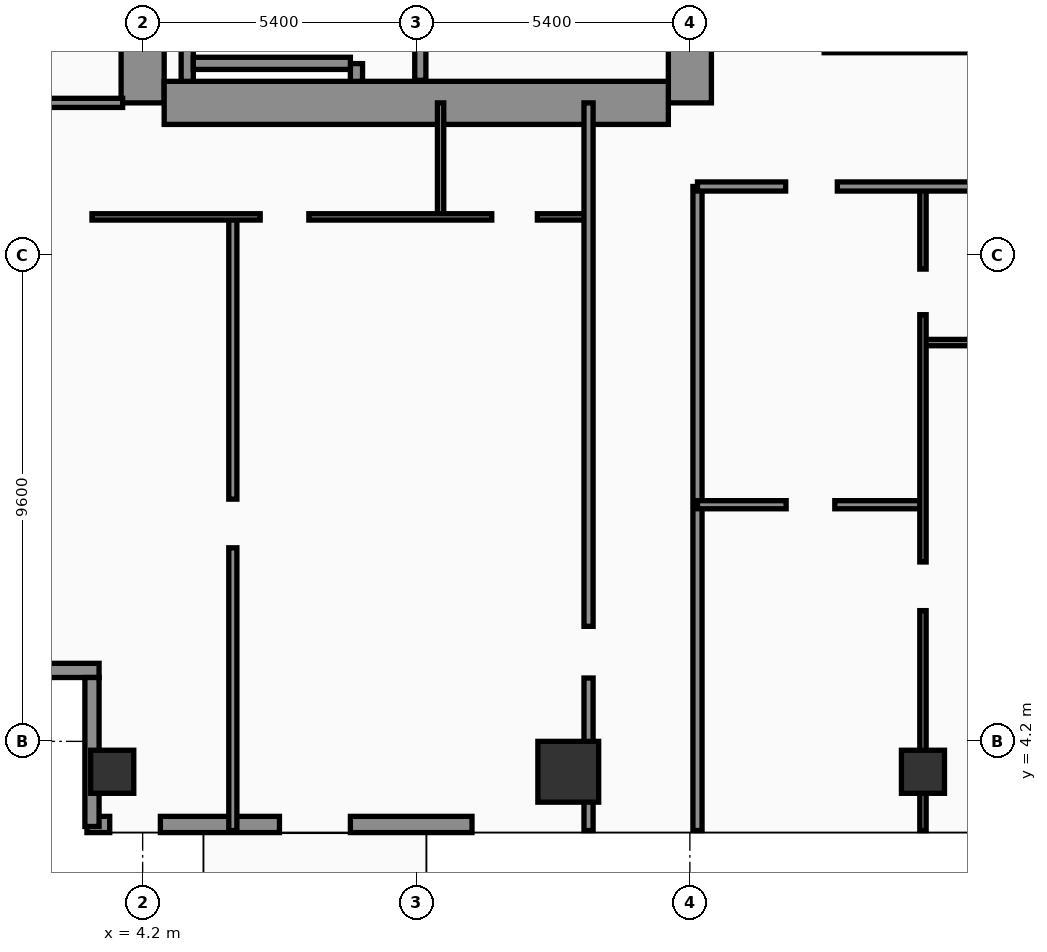
"""IFC4 building model, lengths in metres.
Left out: names, types, materials, properties, quantities, classifications, styles, units other than length and angle.
Written with IfcOpenShell. Run it as: python <this file> out.ifc"""

import sys

from ifc_helpers import new_model, si_unit, direction, frame, frame_2d, origin, origin_2d, place, context, subcontext, project, spatial, rectangle, hollow_rectangle, extrude, element, fill, save


model = new_model("IFC4")
c1 = context("Model", 3, precision=1e-05, world=origin(), true_north=direction((0.0, 1.0)))
c2 = subcontext(c1, "Body", "Model", "MODEL_VIEW")
j1 = project(units=[si_unit("LENGTHUNIT", "METRE"), si_unit("PLANEANGLEUNIT", "RADIAN")], contexts=[c1])
p1 = place(None, origin())
s1 = spatial("IfcSite", under=j1, at=p1, CompositionType="ELEMENT")
p2 = place(p1, origin())
s2 = spatial("IfcBuilding", under=s1, at=p2, CompositionType="ELEMENT")
p3 = place(p2, frame((0.0, 0.0, 116.4)))
s3 = spatial("IfcBuildingStorey", under=s2, at=p3, CompositionType="ELEMENT", Elevation=116.4)
p4 = place(p3, frame((4.2, 16.8, 0.0), z_axis=(0.0, 0.0, 1.0), x_axis=(0.0, 1.0, 0.0)))
e1 = element("IfcWall", 1, at=p4, inside=s3, PredefinedType="SHEAR", context=c2, shape_type="SweptSolid", body=[
    extrude(rectangle(XDim=21.6, YDim=0.85, at=frame_2d((10.8, 0.0))), origin(), (0.0, 0.0, 1.0), 3.56),
])
p5 = place(p3, frame((15.0, 16.8, 0.0), z_axis=(0.0, 0.0, 1.0), x_axis=(0.0, 1.0, 0.0)))
e2 = element("IfcWall", 2, at=p5, inside=s3, PredefinedType="SHEAR", context=c2, shape_type="SweptSolid", body=[
    extrude(rectangle(XDim=21.6, YDim=0.85, at=frame_2d((10.8, 0.0))), origin(), (0.0, 0.0, 1.0), 3.56),
])
p6 = place(p5, frame((8.65, 0.0, 0.0)))
e3 = element("IfcOpeningElement", 3, at=p6, cuts=e2, PredefinedType="OPENING", context=c2, shape_type="SweptSolid", body=[
    extrude(rectangle(XDim=1.1, YDim=2.2, at=frame_2d((0.55, 1.1))), frame((0.0, 0.435, 0.0), z_axis=(0.0, -1.0, 0.0), x_axis=(1.0, 0.0, 0.0)), (0.0, 0.0, 1.0), 0.87),
])
p7 = place(p5, frame((10.85, 0.0, 0.0)))
e4 = element("IfcOpeningElement", 4, at=p7, cuts=e2, PredefinedType="OPENING", context=c2, shape_type="SweptSolid", body=[
    extrude(rectangle(XDim=1.1, YDim=2.2, at=frame_2d((0.55, 1.1))), frame((0.0, 0.435, 0.0), z_axis=(0.0, -1.0, 0.0), x_axis=(1.0, 0.0, 0.0)), (0.0, 0.0, 1.0), 0.87),
])
p8 = place(p5, frame((13.5, 0.0, 0.0)))
e5 = element("IfcOpeningElement", 5, at=p8, cuts=e2, PredefinedType="OPENING", context=c2, shape_type="SweptSolid", body=[
    extrude(rectangle(XDim=1.1, YDim=2.2, at=frame_2d((0.55, 1.1))), frame((0.0, 0.435, 0.0), z_axis=(0.0, -1.0, 0.0), x_axis=(1.0, 0.0, 0.0)), (0.0, 0.0, 1.0), 0.87),
])
p9 = place(p5, frame((16.15, 0.0, 0.0)))
e6 = element("IfcOpeningElement", 6, at=p9, cuts=e2, PredefinedType="OPENING", context=c2, shape_type="SweptSolid", body=[
    extrude(rectangle(XDim=1.1, YDim=2.2, at=frame_2d((0.55, 1.1))), frame((0.0, 0.435, 0.0), z_axis=(0.0, -1.0, 0.0), x_axis=(1.0, 0.0, 0.0)), (0.0, 0.0, 1.0), 0.87),
])
p10 = place(p3, frame((4.625, 16.8, 0.0), z_axis=(0.0, 0.0, 1.0), x_axis=(1.0, 0.0, 0.0)))
e7 = element("IfcWall", 7, at=p10, inside=s3, PredefinedType="SHEAR", context=c2, shape_type="SweptSolid", body=[
    extrude(rectangle(XDim=9.95, YDim=0.85, at=frame_2d((4.975, 0.0))), origin(), (0.0, 0.0, 1.0), 3.56),
])
p11 = place(p3, frame((5.08, 17.225, 0.0), z_axis=(0.0, 0.0, 1.0), x_axis=(0.0, 1.0, 0.0)))
e8 = element("IfcWall", 8, at=p11, inside=s3, PredefinedType="SOLIDWALL", context=c2, shape_type="SweptSolid", body=[
    extrude(rectangle(XDim=9.565, YDim=0.24, at=frame_2d((4.782, 0.0))), origin(), (0.0, 0.0, 1.0), 3.56),
])
p12 = place(p3, frame((8.42, 17.225, 0.0), z_axis=(0.0, 0.0, 1.0), x_axis=(0.0, 1.0, 0.0)))
e9 = element("IfcWall", 9, at=p12, inside=s3, PredefinedType="SOLIDWALL", context=c2, shape_type="SweptSolid", body=[
    extrude(rectangle(XDim=9.565, YDim=0.24, at=frame_2d((4.782, 0.0))), origin(), (0.0, 0.0, 1.0), 3.56),
])
p13 = place(p12, frame((0.35, 0.0, 0.0)))
e10 = element("IfcOpeningElement", 10, at=p13, cuts=e9, PredefinedType="OPENING", context=c2, shape_type="SweptSolid", body=[
    extrude(rectangle(XDim=1.15, YDim=2.2, at=frame_2d((0.575, 1.1))), frame((0.0, 0.13, 0.0), z_axis=(0.0, -1.0, 0.0), x_axis=(1.0, 0.0, 0.0)), (0.0, 0.0, 1.0), 0.26),
])
p14 = place(p3, frame((5.2, 17.58, 0.0), z_axis=(0.0, 0.0, 1.0), x_axis=(1.0, 0.0, 0.0)))
e11 = element("IfcWall", 11, at=p14, inside=s3, PredefinedType="SOLIDWALL", context=c2, shape_type="SweptSolid", body=[
    extrude(rectangle(XDim=3.1, YDim=0.24, at=frame_2d((1.55, 0.0))), origin(), (0.0, 0.0, 1.0), 3.56),
])
p15 = place(p3, frame((3.6, 3.6, 0.0), z_axis=(0.0, 0.0, 1.0), x_axis=(1.0, 0.0, 0.0)))
e12 = element("IfcColumn", 12, at=p15, inside=s3, PredefinedType="COLUMN", context=c2, shape_type="SweptSolid", body=[
    extrude(hollow_rectangle(XDim=0.85, YDim=0.85, WallThickness=0.036, at=origin_2d()), origin(), (0.0, 0.0, 1.0), 3.56),
])
p16 = place(p3, frame((12.6, 3.6, 0.0), z_axis=(0.0, 0.0, 1.0), x_axis=(1.0, 0.0, 0.0)))
e13 = element("IfcColumn", 13, at=p16, inside=s3, PredefinedType="COLUMN", context=c2, shape_type="SweptSolid", body=[
    extrude(rectangle(XDim=1.2, YDim=1.2, at=origin_2d()), origin(), (0.0, 0.0, 1.0), 3.56),
])
p17 = place(p3, frame((19.6, 3.6, 0.0), z_axis=(0.0, 0.0, 1.0), x_axis=(1.0, 0.0, 0.0)))
e14 = element("IfcColumn", 14, at=p17, inside=s3, PredefinedType="COLUMN", context=c2, shape_type="SweptSolid", body=[
    extrude(hollow_rectangle(XDim=0.85, YDim=0.85, WallThickness=0.036, at=origin_2d()), origin(), (0.0, 0.0, 1.0), 3.56),
])
p18 = place(p3, frame((3.1, 2.56, 0.0), z_axis=(0.0, 0.0, 1.0), x_axis=(1.0, 0.0, 0.0)))
e15 = element("IfcWall", 15, at=p18, inside=s3, PredefinedType="SOLIDWALL", context=c2, shape_type="SweptSolid", body=[
    extrude(rectangle(XDim=7.6, YDim=0.32, at=frame_2d((3.8, 0.0))), origin(), (0.0, 0.0, 1.0), 3.56),
])
p19 = place(p18, frame((0.45, 0.0, 0.75)))
e16 = element("IfcOpeningElement", 16, at=p19, cuts=e15, PredefinedType="OPENING", context=c2, shape_type="SweptSolid", body=[
    extrude(rectangle(XDim=1.0, YDim=1.6, at=frame_2d((0.5, 0.8))), frame((0.0, 0.17, 0.0), z_axis=(0.0, -1.0, 0.0), x_axis=(1.0, 0.0, 0.0)), (0.0, 0.0, 1.0), 0.34),
])
p20 = place(p18, frame((3.8, 0.0, 0.0)))
e17 = element("IfcOpeningElement", 17, at=p20, cuts=e15, PredefinedType="OPENING", context=c2, shape_type="SweptSolid", body=[
    extrude(rectangle(XDim=1.4, YDim=2.25, at=frame_2d((0.7, 1.125))), frame((0.0, 0.17, 0.0), z_axis=(0.0, -1.0, 0.0), x_axis=(1.0, 0.0, 0.0)), (0.0, 0.0, 1.0), 0.34),
])
p21 = place(p3, frame((0.12, 5.6, 0.0), z_axis=(0.0, 0.0, 1.0), x_axis=(1.0, 0.0, 0.0)))
e18 = element("IfcWall", 18, at=p21, inside=s3, PredefinedType="SOLIDWALL", context=c2, shape_type="SweptSolid", body=[
    extrude(rectangle(XDim=3.22, YDim=0.28, at=frame_2d((1.61, 0.0))), origin(), (0.0, 0.0, 1.0), 2.84),
])
p22 = place(p3, frame((3.2, 5.46, 0.0), z_axis=(0.0, 0.0, 1.0), x_axis=(0.0, -1.0, 0.0)))
e19 = element("IfcWall", 19, at=p22, inside=s3, PredefinedType="SOLIDWALL", context=c2, shape_type="SweptSolid", body=[
    extrude(rectangle(XDim=2.94, YDim=0.28, at=frame_2d((1.47, 0.0))), origin(), (0.0, 0.0, 1.0), 2.84),
])
p23 = place(p3, frame((9.68, 17.245, 0.0), z_axis=(0.0, 0.0, 1.0), x_axis=(0.0, 1.0, 0.0)))
e20 = element("IfcWall", 20, at=p23, inside=s3, PredefinedType="SOLIDWALL", context=c2, shape_type="SweptSolid", body=[
    extrude(rectangle(XDim=7.755, YDim=0.22, at=frame_2d((3.877, 0.0))), origin(), (0.0, 0.0, 1.0), 3.56),
])
p24 = place(p3, frame((0.08, 16.8, 0.0), z_axis=(0.0, 0.0, 1.0), x_axis=(1.0, 0.0, 0.0)))
e21 = element("IfcWall", 21, at=p24, inside=s3, PredefinedType="PARTITIONING", context=c2, shape_type="SweptSolid", body=[
    extrude(rectangle(XDim=3.725, YDim=0.18, at=frame_2d((1.862, 0.0))), origin(), (0.0, 0.0, 1.0), 2.84),
])
p25 = place(p3, frame((10.08, 14.55, 0.0), z_axis=(0.0, 0.0, 1.0), x_axis=(0.0, 1.0, 0.0)))
e22 = element("IfcWall", 22, at=p25, inside=s3, PredefinedType="PARTITIONING", context=c2, shape_type="SweptSolid", body=[
    extrude(rectangle(XDim=2.25, YDim=0.125, at=frame_2d((1.125, 0.0))), origin(), (0.0, 0.0, 1.0), 3.56),
])
p26 = place(p3, frame((5.98, 2.44, 0.0), z_axis=(0.0, 0.0, 1.0), x_axis=(0.0, 1.0, 0.0)))
e23 = element("IfcWall", 23, at=p26, inside=s3, PredefinedType="PARTITIONING", context=c2, shape_type="SweptSolid", body=[
    extrude(rectangle(XDim=12.11, YDim=0.16, at=frame_2d((6.055, 0.0))), origin(), (0.0, 0.0, 1.0), 3.04),
])
p27 = place(p26, frame((5.58, 0.0, 0.0)))
e24 = element("IfcOpeningElement", 24, at=p27, cuts=e23, PredefinedType="OPENING", context=c2, shape_type="SweptSolid", body=[
    extrude(rectangle(XDim=0.96, YDim=2.2, at=frame_2d((0.48, 1.1))), frame((0.0, 0.09, 0.0), z_axis=(0.0, -1.0, 0.0), x_axis=(1.0, 0.0, 0.0)), (0.0, 0.0, 1.0), 0.18),
])
p28 = place(p3, frame((3.2, 14.55, 0.0), z_axis=(0.0, 0.0, 1.0), x_axis=(1.0, 0.0, 0.0)))
e25 = element("IfcWall", 25, at=p28, inside=s3, PredefinedType="PARTITIONING", context=c2, shape_type="SweptSolid", body=[
    extrude(rectangle(XDim=9.8, YDim=0.125, at=frame_2d((4.9, 0.0))), origin(), (0.0, 0.0, 1.0), 2.84),
])
p29 = place(p28, frame((3.32, 0.0, 0.0)))
e26 = element("IfcOpeningElement", 26, at=p29, cuts=e25, PredefinedType="OPENING", context=c2, shape_type="SweptSolid", body=[
    extrude(rectangle(XDim=0.96, YDim=2.2, at=frame_2d((0.48, 1.1))), frame((0.0, 0.073, 0.0), z_axis=(0.0, -1.0, 0.0), x_axis=(1.0, 0.0, 0.0)), (0.0, 0.0, 1.0), 0.145),
])
p30 = place(p28, frame((7.89, 0.0, 0.0)))
e27 = element("IfcOpeningElement", 27, at=p30, cuts=e25, PredefinedType="OPENING", context=c2, shape_type="SweptSolid", body=[
    extrude(rectangle(XDim=0.9, YDim=2.15, at=frame_2d((0.45, 1.075))), frame((0.0, 0.073, 0.0), z_axis=(0.0, -1.0, 0.0), x_axis=(1.0, 0.0, 0.0)), (0.0, 0.0, 1.0), 0.145),
])
p31 = place(p3, frame((13.0, 2.44, 0.0), z_axis=(0.0, 0.0, 1.0), x_axis=(0.0, 1.0, 0.0)))
e28 = element("IfcWall", 28, at=p31, inside=s3, PredefinedType="PARTITIONING", context=c2, shape_type="SweptSolid", body=[
    extrude(rectangle(XDim=14.36, YDim=0.18, at=frame_2d((7.18, 0.0))), origin(), (0.0, 0.0, 1.0), 2.84),
])
p32 = place(p31, frame((3.01, 0.0, 0.0)))
e29 = element("IfcOpeningElement", 29, at=p32, cuts=e28, PredefinedType="OPENING", context=c2, shape_type="SweptSolid", body=[
    extrude(rectangle(XDim=1.02, YDim=2.2, at=frame_2d((0.51, 1.1))), frame((0.0, 0.1, 0.0), z_axis=(0.0, -1.0, 0.0), x_axis=(1.0, 0.0, 0.0)), (0.0, 0.0, 1.0), 0.2),
])
p33 = place(p3, frame((15.15, 2.44, 0.0), z_axis=(0.0, 0.0, 1.0), x_axis=(0.0, 1.0, 0.0)))
e30 = element("IfcWall", 30, at=p33, inside=s3, PredefinedType="PARTITIONING", context=c2, shape_type="SweptSolid", body=[
    extrude(rectangle(XDim=12.71, YDim=0.18, at=frame_2d((6.355, 0.0))), origin(), (0.0, 0.0, 1.0), 3.04),
])
p34 = place(p3, frame((19.6, 12.07, 0.0), z_axis=(0.0, 0.0, 1.0), x_axis=(1.0, 0.0, 0.0)))
e31 = element("IfcWall", 31, at=p34, inside=s3, PredefinedType="PARTITIONING", context=c2, shape_type="SweptSolid", body=[
    extrude(rectangle(XDim=2.0, YDim=0.125, at=frame_2d((1.0, 0.0))), origin(), (0.0, 0.0, 1.0), 3.56),
])
p35 = place(p3, frame((15.15, 8.87, 0.0), z_axis=(0.0, 0.0, 1.0), x_axis=(1.0, 0.0, 0.0)))
e32 = element("IfcWall", 32, at=p35, inside=s3, PredefinedType="PARTITIONING", context=c2, shape_type="SweptSolid", body=[
    extrude(rectangle(XDim=4.45, YDim=0.16, at=frame_2d((2.225, 0.0))), origin(), (0.0, 0.0, 1.0), 3.56),
])
p36 = place(p35, frame((1.75, 0.0, 0.0)))
e33 = element("IfcOpeningElement", 33, at=p36, cuts=e32, PredefinedType="OPENING", context=c2, shape_type="SweptSolid", body=[
    extrude(rectangle(XDim=0.96, YDim=2.2, at=frame_2d((0.48, 1.1))), frame((0.0, 0.09, 0.0), z_axis=(0.0, -1.0, 0.0), x_axis=(1.0, 0.0, 0.0)), (0.0, 0.0, 1.0), 0.18),
])
p37 = place(p3, frame((19.6, 2.44, 0.0), z_axis=(0.0, 0.0, 1.0), x_axis=(0.0, 1.0, 0.0)))
e34 = element("IfcWall", 34, at=p37, inside=s3, PredefinedType="PARTITIONING", context=c2, shape_type="SweptSolid", body=[
    extrude(rectangle(XDim=12.71, YDim=0.125, at=frame_2d((6.355, 0.0))), origin(), (0.0, 0.0, 1.0), 2.49),
])
p38 = place(p37, frame((4.34, 0.0, 0.0)))
e35 = element("IfcOpeningElement", 35, at=p38, cuts=e34, PredefinedType="OPENING", context=c2, shape_type="SweptSolid", body=[
    extrude(rectangle(XDim=0.96, YDim=2.2, at=frame_2d((0.48, 1.1))), frame((0.0, 0.073, 0.0), z_axis=(0.0, -1.0, 0.0), x_axis=(1.0, 0.0, 0.0)), (0.0, 0.0, 1.0), 0.145),
])
p39 = place(p37, frame((10.18, 0.0, 0.0)))
e36 = element("IfcOpeningElement", 36, at=p39, cuts=e34, PredefinedType="OPENING", context=c2, shape_type="SweptSolid", body=[
    extrude(rectangle(XDim=0.9, YDim=2.15, at=frame_2d((0.45, 1.075))), frame((0.0, 0.073, 0.0), z_axis=(0.0, -1.0, 0.0), x_axis=(1.0, 0.0, 0.0)), (0.0, 0.0, 1.0), 0.145),
])
p40 = place(p3, frame((15.15, 15.15, 0.0), z_axis=(0.0, 0.0, 1.0), x_axis=(1.0, 0.0, 0.0)))
e37 = element("IfcWall", 37, at=p40, inside=s3, PredefinedType="PARTITIONING", context=c2, shape_type="SweptSolid", body=[
    extrude(rectangle(XDim=6.45, YDim=0.18, at=frame_2d((3.225, 0.0))), origin(), (0.0, 0.0, 1.0), 2.49),
])
p41 = place(p40, frame((1.74, 0.0, 0.0)))
e38 = element("IfcOpeningElement", 38, at=p41, cuts=e37, PredefinedType="OPENING", context=c2, shape_type="SweptSolid", body=[
    extrude(rectangle(XDim=1.02, YDim=2.2, at=frame_2d((0.51, 1.1))), frame((0.0, 0.1, 0.0), z_axis=(0.0, -1.0, 0.0), x_axis=(1.0, 0.0, 0.0)), (0.0, 0.0, 1.0), 0.2),
])
p42 = place(p3, frame((17.65, 17.88, 0.0), z_axis=(0.0, 0.0, 1.0), x_axis=(1.0, 0.0, 0.0)))
e39 = element("IfcWall", 39, at=p42, inside=s3, PredefinedType="PARTITIONING", context=c2, shape_type="SweptSolid", body=[
    extrude(rectangle(XDim=3.9, YDim=0.18, at=frame_2d((1.95, 0.0))), origin(), (0.0, 0.0, 1.0), 3.56),
])
p43 = place(p19, origin())
e40 = element("IfcWindow", 40, at=p43, inside=s3, PartitioningType="SINGLE_PANEL", PredefinedType="WINDOW", context=c2, shape_type="SweptSolid", body=[
    extrude(rectangle(XDim=1.0, YDim=1.6, at=frame_2d((0.5, 0.8))), frame((0.0, 0.03, 0.0), z_axis=(0.0, -1.0, 0.0), x_axis=(1.0, 0.0, 0.0)), (0.0, 0.0, 1.0), 0.06),
])
fill(e16, e40)
p44 = place(p20, origin())
e41 = element("IfcDoor", 41, at=p44, inside=s3, OperationType="SINGLE_SWING_LEFT", PredefinedType="DOOR", context=c2, shape_type="SweptSolid", body=[
    extrude(rectangle(XDim=1.4, YDim=2.25, at=frame_2d((0.7, 1.125))), frame((0.0, 0.025, 0.0), z_axis=(0.0, -1.0, 0.0), x_axis=(1.0, 0.0, 0.0)), (0.0, 0.0, 1.0), 0.05),
])
fill(e17, e41)
p45 = place(p27, origin())
e42 = element("IfcDoor", 42, at=p45, inside=s3, OperationType="SINGLE_SWING_LEFT", PredefinedType="DOOR", context=c2, shape_type="SweptSolid", body=[
    extrude(rectangle(XDim=0.96, YDim=2.2, at=frame_2d((0.48, 1.1))), frame((0.0, 0.025, 0.0), z_axis=(0.0, -1.0, 0.0), x_axis=(1.0, 0.0, 0.0)), (0.0, 0.0, 1.0), 0.05),
])
fill(e24, e42)
p46 = place(p29, origin())
e43 = element("IfcDoor", 43, at=p46, inside=s3, OperationType="SINGLE_SWING_LEFT", PredefinedType="DOOR", context=c2, shape_type="SweptSolid", body=[
    extrude(rectangle(XDim=0.96, YDim=2.2, at=frame_2d((0.48, 1.1))), frame((0.0, 0.025, 0.0), z_axis=(0.0, -1.0, 0.0), x_axis=(1.0, 0.0, 0.0)), (0.0, 0.0, 1.0), 0.05),
])
fill(e26, e43)
p47 = place(p30, origin())
e44 = element("IfcDoor", 44, at=p47, inside=s3, OperationType="SINGLE_SWING_RIGHT", PredefinedType="DOOR", context=c2, shape_type="SweptSolid", body=[
    extrude(rectangle(XDim=0.9, YDim=2.15, at=frame_2d((0.45, 1.075))), frame((0.0, 0.025, 0.0), z_axis=(0.0, -1.0, 0.0), x_axis=(1.0, 0.0, 0.0)), (0.0, 0.0, 1.0), 0.05),
])
fill(e27, e44)
p48 = place(p32, origin())
e45 = element("IfcDoor", 45, at=p48, inside=s3, OperationType="SINGLE_SWING_LEFT", PredefinedType="DOOR", context=c2, shape_type="SweptSolid", body=[
    extrude(rectangle(XDim=1.02, YDim=2.2, at=frame_2d((0.51, 1.1))), frame((0.0, 0.025, 0.0), z_axis=(0.0, -1.0, 0.0), x_axis=(1.0, 0.0, 0.0)), (0.0, 0.0, 1.0), 0.05),
])
fill(e29, e45)
p49 = place(p36, origin())
e46 = element("IfcDoor", 46, at=p49, inside=s3, OperationType="SINGLE_SWING_LEFT", PredefinedType="DOOR", context=c2, shape_type="SweptSolid", body=[
    extrude(rectangle(XDim=0.96, YDim=2.2, at=frame_2d((0.48, 1.1))), frame((0.0, 0.025, 0.0), z_axis=(0.0, -1.0, 0.0), x_axis=(1.0, 0.0, 0.0)), (0.0, 0.0, 1.0), 0.05),
])
fill(e33, e46)
p50 = place(p38, origin())
e47 = element("IfcDoor", 47, at=p50, inside=s3, OperationType="SINGLE_SWING_LEFT", PredefinedType="DOOR", context=c2, shape_type="SweptSolid", body=[
    extrude(rectangle(XDim=0.96, YDim=2.2, at=frame_2d((0.48, 1.1))), frame((0.0, 0.025, 0.0), z_axis=(0.0, -1.0, 0.0), x_axis=(1.0, 0.0, 0.0)), (0.0, 0.0, 1.0), 0.05),
])
fill(e35, e47)
p51 = place(p39, origin())
e48 = element("IfcDoor", 48, at=p51, inside=s3, OperationType="SINGLE_SWING_RIGHT", PredefinedType="DOOR", context=c2, shape_type="SweptSolid", body=[
    extrude(rectangle(XDim=0.9, YDim=2.15, at=frame_2d((0.45, 1.075))), frame((0.0, 0.025, 0.0), z_axis=(0.0, -1.0, 0.0), x_axis=(1.0, 0.0, 0.0)), (0.0, 0.0, 1.0), 0.05),
])
fill(e36, e48)
p52 = place(p41, origin())
e49 = element("IfcDoor", 49, at=p52, inside=s3, OperationType="SINGLE_SWING_LEFT", PredefinedType="DOOR", context=c2, shape_type="SweptSolid", body=[
    extrude(rectangle(XDim=1.02, YDim=2.2, at=frame_2d((0.51, 1.1))), frame((0.0, 0.025, 0.0), z_axis=(0.0, -1.0, 0.0), x_axis=(1.0, 0.0, 0.0)), (0.0, 0.0, 1.0), 0.05),
])
fill(e38, e49)
p53 = place(p13, origin())
e50 = element("IfcDoor", 50, at=p53, inside=s3, OperationType="SINGLE_SWING_LEFT", PredefinedType="DOOR", context=c2, shape_type="SweptSolid", body=[
    extrude(rectangle(XDim=1.15, YDim=2.2, at=frame_2d((0.575, 1.1))), frame((0.0, 0.025, 0.0), z_axis=(0.0, -1.0, 0.0), x_axis=(1.0, 0.0, 0.0)), (0.0, 0.0, 1.0), 0.05),
])
fill(e10, e50)
save(model, sys.argv[1])
